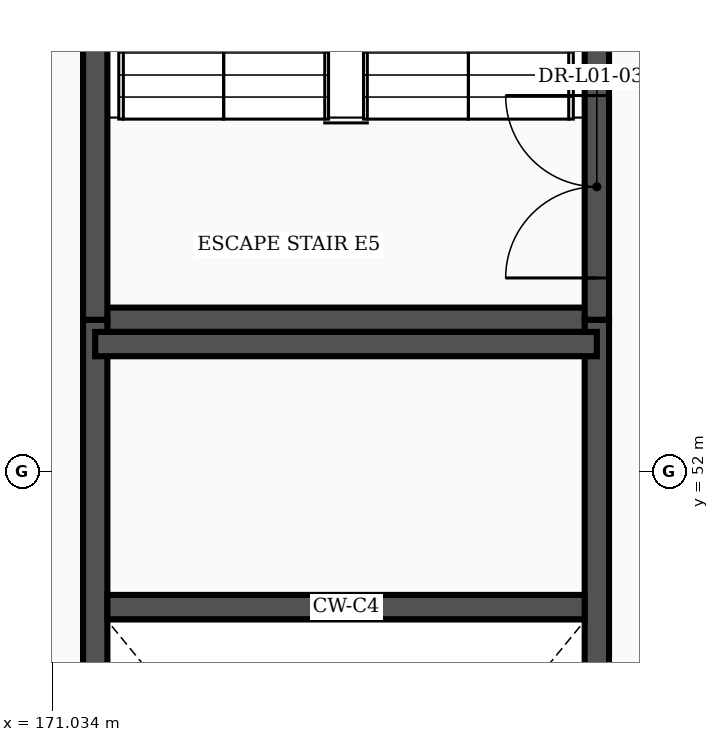
"""IFC4 building model, lengths in metres.
Left out: names, types, materials, properties, quantities, classifications, styles, units other than length and angle.
Written with IfcOpenShell. Run it as: python <this file> out.ifc"""

import sys

from ifc_helpers import new_model, si_unit, direction, frame, frame_2d, origin, place, context, subcontext, project, spatial, rectangle, extrude, element, fill, save


model = new_model("IFC4")
c1 = context("Model", 3, precision=1e-05, world=origin(), true_north=direction((0.0, 1.0)))
c2 = subcontext(c1, "Body", "Model", "MODEL_VIEW")
j1 = project(units=[si_unit("LENGTHUNIT", "METRE"), si_unit("PLANEANGLEUNIT", "RADIAN")], contexts=[c1])
p1 = place(None, origin())
s1 = spatial("IfcSite", under=j1, at=p1, CompositionType="ELEMENT")
p2 = place(p1, origin())
s2 = spatial("IfcBuilding", under=s1, at=p2, CompositionType="ELEMENT")
p3 = place(p2, frame((0.0, 0.0, 6.0)))
s3 = spatial("IfcBuildingStorey", under=s2, at=p3, CompositionType="ELEMENT", Elevation=6.0)
p4 = place(p3, frame((171.6, 54.0, 0.0), z_axis=(0.0, 0.0, 1.0), x_axis=(1.0, 0.0, 0.0)))
e1 = element("IfcWall", 1, at=p4, inside=s3, PredefinedType="SHEAR", context=c2, shape_type="SweptSolid", body=[
    extrude(rectangle(XDim=6.6, YDim=0.32, at=frame_2d((3.3, 0.0))), origin(), (0.0, 0.0, 1.0), 5.15),
])
p5 = place(p3, frame((171.6, 39.4, 0.0), z_axis=(0.0, 0.0, 1.0), x_axis=(0.0, 1.0, 0.0)))
e2 = element("IfcWall", 2, at=p5, inside=s3, PredefinedType="SHEAR", context=c2, shape_type="SweptSolid", body=[
    extrude(rectangle(XDim=14.6, YDim=0.32, at=frame_2d((7.3, 0.0))), origin(), (0.0, 0.0, 1.0), 5.15),
])
p6 = place(p3, frame((178.2, 39.4, 0.0), z_axis=(0.0, 0.0, 1.0), x_axis=(0.0, 1.0, 0.0)))
e3 = element("IfcWall", 3, at=p6, inside=s3, PredefinedType="SHEAR", context=c2, shape_type="SweptSolid", body=[
    extrude(rectangle(XDim=14.6, YDim=0.32, at=frame_2d((7.3, 0.0))), origin(), (0.0, 0.0, 1.0), 5.15),
])
p7 = place(p6, frame((0.55, 0.0, 0.0)))
e4 = element("IfcOpeningElement", 4, at=p7, cuts=e3, PredefinedType="OPENING", context=c2, shape_type="SweptSolid", body=[
    extrude(rectangle(XDim=2.4, YDim=2.25, at=frame_2d((1.2, 1.125))), frame((0.0, 0.172, 0.0), z_axis=(0.0, -1.0, 0.0), x_axis=(1.0, 0.0, 0.0)), (0.0, 0.0, 1.0), 0.344),
])
p8 = place(p3, frame((171.76, 50.22, 0.0), z_axis=(0.0, 0.0, 1.0), x_axis=(1.0, 0.0, 0.0)))
e5 = element("IfcWall", 5, at=p8, inside=s3, PredefinedType="SHEAR", context=c2, shape_type="SweptSolid", body=[
    extrude(rectangle(XDim=6.28, YDim=0.32, at=frame_2d((3.14, 0.0))), origin(), (0.0, 0.0, 1.0), 5.15),
])
p9 = place(p3, frame((171.6, 53.68, 0.0), z_axis=(0.0, 0.0, 1.0), x_axis=(1.0, 0.0, 0.0)))
e6 = element("IfcWall", 6, at=p9, inside=s3, PredefinedType="SHEAR", context=c2, shape_type="SweptSolid", body=[
    extrude(rectangle(XDim=6.6, YDim=0.32, at=frame_2d((3.3, 0.0))), origin(), (0.0, 0.0, 1.0), 5.15),
])
p10 = place(p3, frame((171.6, 54.0, 0.0), z_axis=(0.0, 0.0, 1.0), x_axis=(0.0, 1.0, 0.0)))
e7 = element("IfcWall", 7, at=p10, inside=s3, PredefinedType="SHEAR", context=c2, shape_type="SweptSolid", body=[
    extrude(rectangle(XDim=12.0, YDim=0.32, at=frame_2d((6.0, 0.0))), origin(), (0.0, 0.0, 1.0), 5.15),
])
p11 = place(p3, frame((178.2, 54.0, 0.0), z_axis=(0.0, 0.0, 1.0), x_axis=(0.0, 1.0, 0.0)))
e8 = element("IfcWall", 8, at=p11, inside=s3, PredefinedType="SHEAR", context=c2, shape_type="SweptSolid", body=[
    extrude(rectangle(XDim=12.0, YDim=0.32, at=frame_2d((6.0, 0.0))), origin(), (0.0, 0.0, 1.0), 5.15),
])
p12 = place(p11, frame((0.55, 0.0, 0.0)))
e9 = element("IfcOpeningElement", 9, at=p12, cuts=e8, PredefinedType="OPENING", context=c2, shape_type="SweptSolid", body=[
    extrude(rectangle(XDim=2.4, YDim=2.25, at=frame_2d((1.2, 1.125))), frame((0.0, 0.172, 0.0), z_axis=(0.0, -1.0, 0.0), x_axis=(1.0, 0.0, 0.0)), (0.0, 0.0, 1.0), 0.344),
])
p13 = place(p12, origin())
e10 = element("IfcDoor", 10, at=p13, inside=s3, OperationType="DOUBLE_DOOR_SINGLE_SWING", PredefinedType="DOOR", context=c2, shape_type="SweptSolid", body=[
    extrude(rectangle(XDim=2.4, YDim=2.25, at=frame_2d((1.2, 1.125))), frame((0.0, 0.025, 0.0), z_axis=(0.0, -1.0, 0.0), x_axis=(1.0, 0.0, 0.0)), (0.0, 0.0, 1.0), 0.05),
])
fill(e9, e10)
save(model, sys.argv[1])
